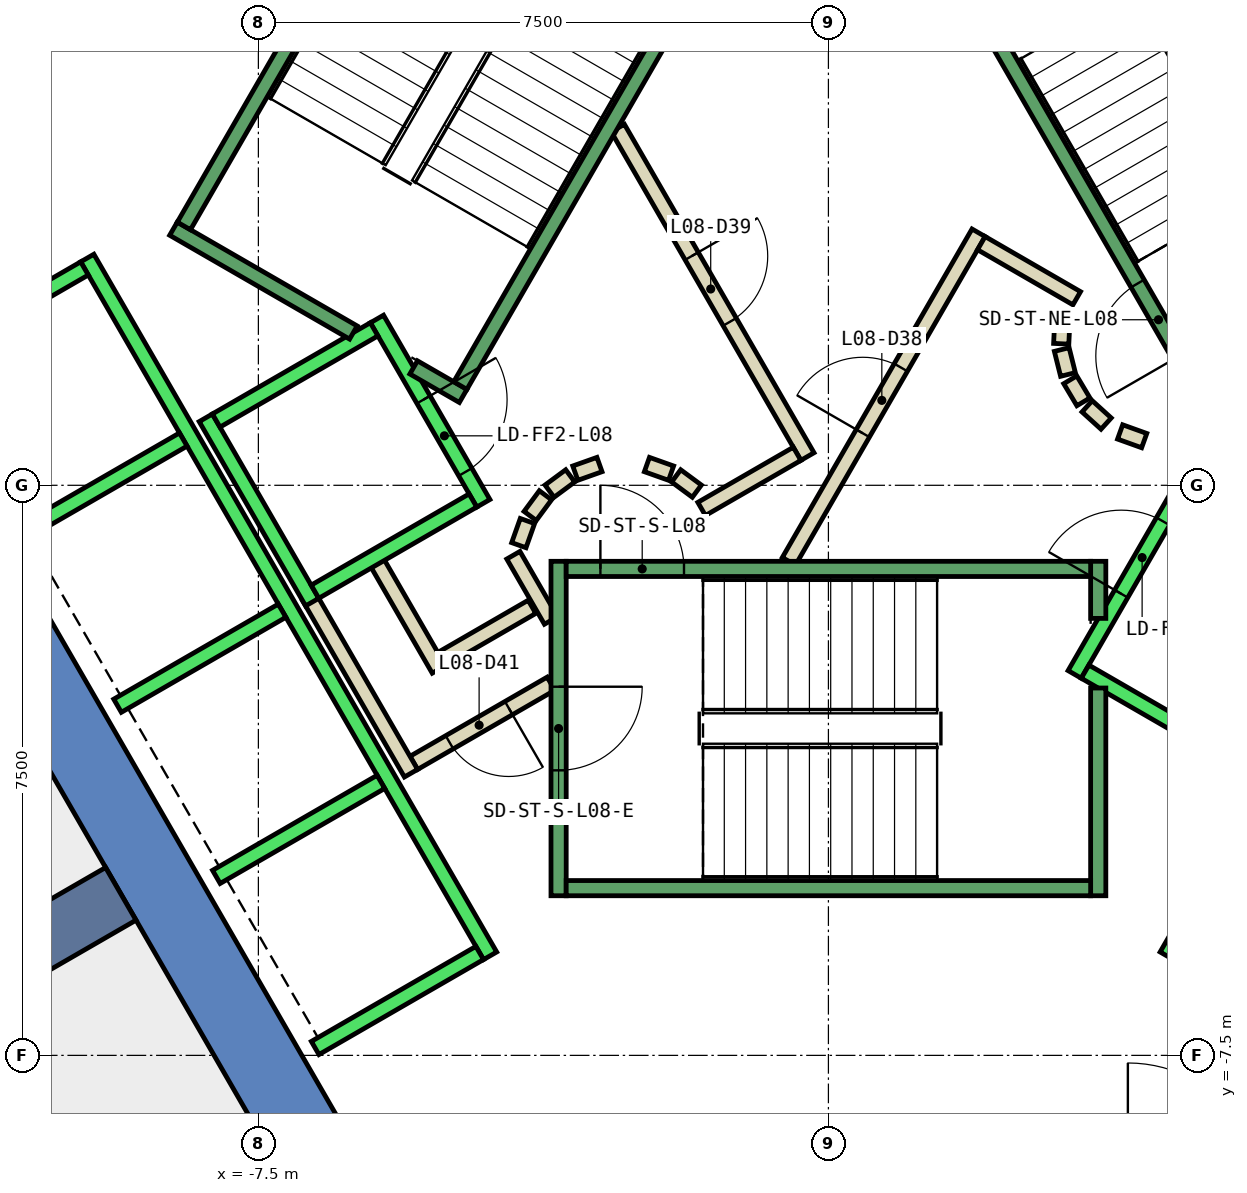
"""IFC4 building model, lengths in metres.
Left out: names, types, materials, properties, quantities, classifications, styles, units other than length and angle.
Written with IfcOpenShell. Run it as: python <this file> out.ifc"""

import sys

from ifc_helpers import new_model, si_unit, direction, frame, frame_2d, origin, place, context, subcontext, project, spatial, polyline, rectangle, outline, extrude, element, fill, save


model = new_model("IFC4")
c1 = context("Model", 3, precision=1e-05, world=origin(), true_north=direction((0.0, 1.0)))
c2 = subcontext(c1, "Body", "Model", "MODEL_VIEW")
j1 = project(units=[si_unit("LENGTHUNIT", "METRE"), si_unit("PLANEANGLEUNIT", "RADIAN")], contexts=[c1])
p1 = place(None, origin())
s1 = spatial("IfcSite", under=j1, at=p1, CompositionType="ELEMENT")
p2 = place(p1, origin())
s2 = spatial("IfcBuilding", under=s1, at=p2, CompositionType="ELEMENT")
p3 = place(p2, frame((0.0, 0.0, 43.4)))
s3 = spatial("IfcBuildingStorey", under=s2, at=p3, CompositionType="ELEMENT", Elevation=43.4)
p4 = place(p3, frame((0.0, 0.0, -0.4)))
e1 = element("IfcWall", 1, at=p4, inside=s3, PredefinedType="SHEAR", context=c2, shape_type="SweptSolid", body=[
    extrude(outline(polyline([(-12.267, 5.252), (-11.402, 4.752), (-6.351, 13.5), (-6.928, 14.5), (-12.267, 5.252)])), origin(), (0.0, 0.0, 1.0), 4.2),
])
p5 = place(p3, frame((0.0, 0.0, -0.4)))
e2 = element("IfcWall", 2, at=p5, inside=s3, PredefinedType="SHEAR", context=c2, shape_type="SweptSolid", body=[
    extrude(outline(polyline([(-13.856, 2.5), (-6.928, -9.5), (-6.351, -8.5), (-12.702, 2.5), (-13.856, 2.5)])), origin(), (0.0, 0.0, 1.0), 4.2),
])
p6 = place(p3, frame((-9.31, -5.375, -0.4), z_axis=(0.0, 0.0, 1.0), x_axis=(-0.866017533419, -0.500013631625, 0.0)))
e3 = element("IfcWall", 3, at=p6, inside=s3, PredefinedType="SHEAR", context=c2, shape_type="SweptSolid", body=[
    extrude(rectangle(XDim=9.0, YDim=0.8, at=frame_2d((4.5, 0.0))), origin(), (0.0, 0.0, 1.0), 4.2),
])
p7 = place(p3, frame((-3.9, -1.599, 0.0), z_axis=(0.0, 0.0, 1.0), x_axis=(-0.865969445389, -0.500096910261, 0.0)))
e4 = element("IfcWall", 4, at=p7, inside=s3, PredefinedType="PARTITIONING", context=c2, shape_type="SweptSolid", body=[
    extrude(rectangle(XDim=1.373, YDim=0.2, at=frame_2d((0.687, 0.0))), origin(), (0.0, 0.0, 1.0), 3.8),
])
p8 = place(p3, frame((-5.126, -2.422, 0.0), z_axis=(0.0, 0.0, 1.0), x_axis=(-0.500062241894, 0.865989465428, 0.0)))
e5 = element("IfcWall", 5, at=p8, inside=s3, PredefinedType="PARTITIONING", context=c2, shape_type="SweptSolid", body=[
    extrude(rectangle(XDim=1.7, YDim=0.2, at=frame_2d((0.85, 0.0))), origin(), (0.0, 0.0, 1.0), 3.8),
])
p9 = place(p3, frame((-3.65, -2.61, 0.0), z_axis=(0.0, 0.0, 1.0), x_axis=(-0.866072462134, -0.499918483688, 0.0)))
e6 = element("IfcWall", 6, at=p9, inside=s3, PredefinedType="PARTITIONING", context=c2, shape_type="SweptSolid", body=[
    extrude(rectangle(XDim=2.084, YDim=0.2, at=frame_2d((1.042, 0.0))), origin(), (0.0, 0.0, 1.0), 3.8),
])
p10 = place(p9, frame((0.642, 0.0, 0.0)))
e7 = element("IfcOpeningElement", 7, at=p10, cuts=e6, PredefinedType="OPENING", context=c2, shape_type="SweptSolid", body=[
    extrude(rectangle(XDim=0.9, YDim=2.1, at=frame_2d((0.45, 1.05))), frame((0.0, 0.11, 0.0), z_axis=(0.0, -1.0, 0.0), x_axis=(1.0, 0.0, 0.0)), (0.0, 0.0, 1.0), 0.22),
])
p11 = place(p3, frame((-5.492, -3.788, 0.0), z_axis=(0.0, 0.0, 1.0), x_axis=(-0.500008949224, 0.866020236886, 0.0)))
e8 = element("IfcWall", 8, at=p11, inside=s3, PredefinedType="PARTITIONING", context=c2, shape_type="SweptSolid", body=[
    extrude(rectangle(XDim=2.68, YDim=0.2, at=frame_2d((1.34, 0.0))), origin(), (0.0, 0.0, 1.0), 3.8),
])
p12 = place(p3, frame((-4.145, -0.92, 0.0), z_axis=(0.0, 0.0, 1.0), x_axis=(0.499743786207, -0.866173278362, 0.0)))
e9 = element("IfcWall", 9, at=p12, inside=s3, PredefinedType="PARTITIONING", context=c2, shape_type="SweptSolid", body=[
    extrude(rectangle(XDim=0.991, YDim=0.2, at=frame_2d((0.495, 0.0))), origin(), (0.0, 0.0, 1.0), 3.8),
])
p13 = place(p3, frame((-0.52, -1.0, 0.0), z_axis=(0.0, 0.0, 1.0), x_axis=(0.50011622646, 0.865958290007, 0.0)))
e10 = element("IfcWall", 10, at=p13, inside=s3, PredefinedType="PARTITIONING", context=c2, shape_type="SweptSolid", body=[
    extrude(rectangle(XDim=4.991, YDim=0.2, at=frame_2d((2.496, 0.0))), origin(), (0.0, 0.0, 1.0), 3.8),
])
p14 = place(p13, frame((1.945, 0.0, 0.0)))
e11 = element("IfcOpeningElement", 11, at=p14, cuts=e10, PredefinedType="OPENING", context=c2, shape_type="SweptSolid", body=[
    extrude(rectangle(XDim=1.0, YDim=2.1, at=frame_2d((0.5, 1.05))), frame((0.0, 0.11, 0.0), z_axis=(0.0, -1.0, 0.0), x_axis=(1.0, 0.0, 0.0)), (0.0, 0.0, 1.0), 0.22),
])
p15 = place(p3, frame((2.012, 3.186, 0.0), z_axis=(0.0, 0.0, 1.0), x_axis=(0.865891012941, -0.500232699559, 0.0)))
e12 = element("IfcWall", 12, at=p15, inside=s3, PredefinedType="PARTITIONING", context=c2, shape_type="SweptSolid", body=[
    extrude(rectangle(XDim=1.449, YDim=0.2, at=frame_2d((0.725, 0.0))), origin(), (0.0, 0.0, 1.0), 3.8),
])
p16 = place(p3, frame((3.079, 2.199, 0.0), z_axis=(0.0, 0.0, 1.0), x_axis=(-0.047771483479, -0.998858290933, 0.0)))
e13 = element("IfcWall", 13, at=p16, inside=s3, PredefinedType="PARTITIONING", context=c2, shape_type="SweptSolid", body=[
    extrude(rectangle(XDim=0.337, YDim=0.2, at=frame_2d((0.169, 0.0))), origin(), (0.0, 0.0, 1.0), 3.8),
])
p17 = place(p3, frame((3.07, 1.786, 0.0), z_axis=(0.0, 0.0, 1.0), x_axis=(0.242705583207, -0.970099994784, 0.0)))
e14 = element("IfcWall", 14, at=p17, inside=s3, PredefinedType="PARTITIONING", context=c2, shape_type="SweptSolid", body=[
    extrude(rectangle(XDim=0.338, YDim=0.2, at=frame_2d((0.169, 0.0))), origin(), (0.0, 0.0, 1.0), 3.8),
])
for number, where, z_axis, x_axis in (
    (15, (3.182, 1.388, 0.0), (0.0, 0.0, 1.0), (0.512, -0.859, 0.0)),
    (16, (3.404, 1.039, 0.0), (0.0, 0.0, 1.0), (0.74, -0.672, 0.0)),
):
    element("IfcWall", number, at=place(p3, frame(where, z_axis=z_axis, x_axis=x_axis)), inside=s3, PredefinedType="PARTITIONING", context=c2, shape_type="SweptSolid", body=[
        extrude(rectangle(XDim=0.338, YDim=0.2, at=frame_2d((0.169, 0.0))), origin(), (0.0, 0.0, 1.0), 3.8),
    ])
p18 = place(p3, frame((3.838, 0.702, 0.0), z_axis=(0.0, 0.0, 1.0), x_axis=(0.941035081519, -0.338308993895, 0.0)))
e17 = element("IfcWall", 17, at=p18, inside=s3, PredefinedType="PARTITIONING", context=c2, shape_type="SweptSolid", body=[
    extrude(rectangle(XDim=0.337, YDim=0.2, at=frame_2d((0.168, 0.0))), origin(), (0.0, 0.0, 1.0), 3.8),
])
p19 = place(p3, frame((-2.771, 4.7, 0.0), z_axis=(0.0, 0.0, 1.0), x_axis=(0.499969479948, -0.866043023828, 0.0)))
e18 = element("IfcWall", 18, at=p19, inside=s3, PredefinedType="PARTITIONING", context=c2, shape_type="SweptSolid", body=[
    extrude(rectangle(XDim=4.99, YDim=0.2, at=frame_2d((2.495, 0.0))), origin(), (0.0, 0.0, 1.0), 3.8),
])
p20 = place(p19, frame((1.945, 0.0, 0.0)))
e19 = element("IfcOpeningElement", 19, at=p20, cuts=e18, PredefinedType="OPENING", context=c2, shape_type="SweptSolid", body=[
    extrude(rectangle(XDim=1.0, YDim=2.1, at=frame_2d((0.5, 1.05))), frame((0.0, 0.11, 0.0), z_axis=(0.0, -1.0, 0.0), x_axis=(1.0, 0.0, 0.0)), (0.0, 0.0, 1.0), 0.22),
])
p21 = place(p3, frame((-0.412, 0.414, 0.0), z_axis=(0.0, 0.0, 1.0), x_axis=(-0.866017369001, -0.500013916395, 0.0)))
e20 = element("IfcWall", 20, at=p21, inside=s3, PredefinedType="PARTITIONING", context=c2, shape_type="SweptSolid", body=[
    extrude(rectangle(XDim=1.45, YDim=0.2, at=frame_2d((0.725, 0.0))), origin(), (0.0, 0.0, 1.0), 3.8),
])
p22 = place(p3, frame((-1.731, -0.077, 0.0), z_axis=(0.0, 0.0, 1.0), x_axis=(-0.804311165252, 0.594208338422, 0.0)))
e21 = element("IfcWall", 21, at=p22, inside=s3, PredefinedType="PARTITIONING", context=c2, shape_type="SweptSolid", body=[
    extrude(rectangle(XDim=0.338, YDim=0.2, at=frame_2d((0.169, 0.0))), origin(), (0.0, 0.0, 1.0), 3.8),
])
p23 = place(p3, frame((-2.07, 0.16, 0.0), z_axis=(0.0, 0.0, 1.0), x_axis=(-0.942199461132, 0.335052496547, 0.0)))
e22 = element("IfcWall", 22, at=p23, inside=s3, PredefinedType="PARTITIONING", context=c2, shape_type="SweptSolid", body=[
    extrude(rectangle(XDim=0.337, YDim=0.2, at=frame_2d((0.169, 0.0))), origin(), (0.0, 0.0, 1.0), 3.8),
])
p24 = place(p3, frame((-3.012, 0.273, 0.0), z_axis=(0.0, 0.0, 1.0), x_axis=(-0.942280615813, -0.334824194261, 0.0)))
e23 = element("IfcWall", 23, at=p24, inside=s3, PredefinedType="PARTITIONING", context=c2, shape_type="SweptSolid", body=[
    extrude(rectangle(XDim=0.338, YDim=0.2, at=frame_2d((0.169, 0.0))), origin(), (0.0, 0.0, 1.0), 3.8),
])
p25 = place(p3, frame((-3.397, 0.124, 0.0), z_axis=(0.0, 0.0, 1.0), x_axis=(-0.804311165252, -0.594208338422, 0.0)))
e24 = element("IfcWall", 24, at=p25, inside=s3, PredefinedType="PARTITIONING", context=c2, shape_type="SweptSolid", body=[
    extrude(rectangle(XDim=0.338, YDim=0.2, at=frame_2d((0.169, 0.0))), origin(), (0.0, 0.0, 1.0), 3.8),
])
p26 = place(p3, frame((-3.723, -0.131, 0.0), z_axis=(0.0, 0.0, 1.0), x_axis=(-0.594675113454, -0.803966112121, 0.0)))
e25 = element("IfcWall", 25, at=p26, inside=s3, PredefinedType="PARTITIONING", context=c2, shape_type="SweptSolid", body=[
    extrude(rectangle(XDim=0.338, YDim=0.2, at=frame_2d((0.169, 0.0))), origin(), (0.0, 0.0, 1.0), 3.8),
])
p27 = place(p3, frame((-3.96, -0.47, 0.0), z_axis=(0.0, 0.0, 1.0), x_axis=(-0.334824194261, -0.942280615813, 0.0)))
e26 = element("IfcWall", 26, at=p27, inside=s3, PredefinedType="PARTITIONING", context=c2, shape_type="SweptSolid", body=[
    extrude(rectangle(XDim=0.338, YDim=0.2, at=frame_2d((0.169, 0.0))), origin(), (0.0, 0.0, 1.0), 3.8),
])
p28 = place(p3, frame((-5.94, 2.188, 0.0), z_axis=(0.0, 0.0, 1.0), x_axis=(0.49994636267, -0.866056369097, 0.0)))
e27 = element("IfcWall", 27, at=p28, inside=s3, PredefinedType="STANDARD", context=c2, shape_type="SweptSolid", body=[
    extrude(rectangle(XDim=2.8, YDim=0.2, at=frame_2d((1.4, 0.0))), origin(), (0.0, 0.0, 1.0), 3.8),
])
p29 = place(p28, frame((1.225, 0.0, 0.0)))
e28 = element("IfcOpeningElement", 28, at=p29, cuts=e27, PredefinedType="OPENING", context=c2, shape_type="SweptSolid", body=[
    extrude(rectangle(XDim=1.1, YDim=2.1, at=frame_2d((0.55, 1.05))), frame((0.0, 0.11, 0.0), z_axis=(0.0, -1.0, 0.0), x_axis=(1.0, 0.0, 0.0)), (0.0, 0.0, 1.0), 0.22),
])
p30 = place(p3, frame((-8.192, 0.888, 0.0), z_axis=(0.0, 0.0, 1.0), x_axis=(0.49994636267, -0.866056369097, 0.0)))
e29 = element("IfcWall", 29, at=p30, inside=s3, PredefinedType="STANDARD", context=c2, shape_type="SweptSolid", body=[
    extrude(rectangle(XDim=2.8, YDim=0.2, at=frame_2d((1.4, 0.0))), origin(), (0.0, 0.0, 1.0), 3.8),
])
for number, where, z_axis, x_axis in (
    (30, (-5.977, 2.052, 0.0), (0.0, 0.0, 1.0), (-0.866, -0.5, 0.0)),
    (31, (-4.677, -0.2, 0.0), (0.0, 0.0, 1.0), (-0.866, -0.5, 0.0)),
):
    element("IfcWall", number, at=place(p3, frame(where, z_axis=z_axis, x_axis=x_axis)), inside=s3, PredefinedType="STANDARD", context=c2, shape_type="SweptSolid", body=[
        extrude(rectangle(XDim=2.399, YDim=0.2, at=frame_2d((1.2, 0.0))), origin(), (0.0, 0.0, 1.0), 3.8),
    ])
p31 = place(p3, frame((-9.751, 2.99, 0.0), z_axis=(0.0, 0.0, 1.0), x_axis=(0.50000090737, -0.866024879913, 0.0)))
e32 = element("IfcWall", 32, at=p31, inside=s3, PredefinedType="STANDARD", context=c2, shape_type="SweptSolid", body=[
    extrude(rectangle(XDim=10.6, YDim=0.2, at=frame_2d((5.3, 0.0))), origin(), (0.0, 0.0, 1.0), 3.8),
])
p32 = place(p3, frame((-9.788, 2.853, 0.0), z_axis=(0.0, 0.0, 1.0), x_axis=(-0.865998541277, -0.500046524342, 0.0)))
e33 = element("IfcWall", 33, at=p32, inside=s3, PredefinedType="STANDARD", context=c2, shape_type="SweptSolid", body=[
    extrude(rectangle(XDim=2.5, YDim=0.2, at=frame_2d((1.25, 0.0))), origin(), (0.0, 0.0, 1.0), 3.8),
])
for number, where, z_axis, x_axis in (
    (34, (-8.488, 0.602, 0.0), (0.0, 0.0, 1.0), (-0.866, -0.5, 0.0)),
    (35, (-7.188, -1.65, 0.0), (0.0, 0.0, 1.0), (-0.866, -0.5, 0.0)),
    (36, (-5.888, -3.902, 0.0), (0.0, 0.0, 1.0), (-0.866, -0.5, 0.0)),
    (37, (-4.588, -6.153, 0.0), (0.0, 0.0, 1.0), (-0.866, -0.5, 0.0)),
):
    element("IfcWall", number, at=place(p3, frame(where, z_axis=z_axis, x_axis=x_axis)), inside=s3, PredefinedType="STANDARD", context=c2, shape_type="SweptSolid", body=[
        extrude(rectangle(XDim=2.5, YDim=0.2, at=frame_2d((1.25, 0.0))), origin(), (0.0, 0.0, 1.0), 3.8),
    ])
p33 = place(p3, frame((3.24, -2.488, 0.0), z_axis=(0.0, 0.0, 1.0), x_axis=(0.49994636267, 0.866056369097, 0.0)))
e38 = element("IfcWall", 38, at=p33, inside=s3, PredefinedType="STANDARD", context=c2, shape_type="SweptSolid", body=[
    extrude(rectangle(XDim=2.8, YDim=0.2, at=frame_2d((1.4, 0.0))), origin(), (0.0, 0.0, 1.0), 3.8),
])
p34 = place(p33, frame((1.225, 0.0, 0.0)))
e39 = element("IfcOpeningElement", 39, at=p34, cuts=e38, PredefinedType="OPENING", context=c2, shape_type="SweptSolid", body=[
    extrude(rectangle(XDim=1.1, YDim=2.1, at=frame_2d((0.55, 1.05))), frame((0.0, 0.11, 0.0), z_axis=(0.0, -1.0, 0.0), x_axis=(1.0, 0.0, 0.0)), (0.0, 0.0, 1.0), 0.22),
])
p35 = place(p3, frame((3.377, -2.452, 0.0), z_axis=(0.0, 0.0, 1.0), x_axis=(0.865955154139, -0.50012165622, 0.0)))
e40 = element("IfcWall", 40, at=p35, inside=s3, PredefinedType="STANDARD", context=c2, shape_type="SweptSolid", body=[
    extrude(rectangle(XDim=2.4, YDim=0.2, at=frame_2d((1.2, 0.0))), origin(), (0.0, 0.0, 1.0), 3.8),
])
p36 = place(p3, frame((4.451, -6.19, 0.0), z_axis=(0.0, 0.0, 1.0), x_axis=(0.50000090737, 0.866024879913, 0.0)))
e41 = element("IfcWall", 41, at=p36, inside=s3, PredefinedType="STANDARD", context=c2, shape_type="SweptSolid", body=[
    extrude(rectangle(XDim=10.6, YDim=0.2, at=frame_2d((5.3, 0.0))), origin(), (0.0, 0.0, 1.0), 3.8),
])
p37 = place(p3, frame((-3.55, -1.0, 0.0), z_axis=(0.0, 0.0, 1.0), x_axis=(0.0, -1.0, 0.0)))
e42 = element("IfcWall", 42, at=p37, inside=s3, PredefinedType="STANDARD", context=c2, shape_type="SweptSolid", body=[
    extrude(rectangle(XDim=4.4, YDim=0.2, at=frame_2d((2.2, 0.0))), origin(), (0.0, 0.0, 1.0), 3.8),
])
p38 = place(p37, frame((1.65, 0.0, 0.0)))
e43 = element("IfcOpeningElement", 43, at=p38, cuts=e42, PredefinedType="OPENING", context=c2, shape_type="SweptSolid", body=[
    extrude(rectangle(XDim=1.1, YDim=2.2, at=frame_2d((0.55, 1.1))), frame((0.0, 0.11, 0.0), z_axis=(0.0, -1.0, 0.0), x_axis=(1.0, 0.0, 0.0)), (0.0, 0.0, 1.0), 0.22),
])
p39 = place(p3, frame((3.55, -2.667, 0.0), z_axis=(0.0, 0.0, 1.0), x_axis=(0.0, -1.0, 0.0)))
e44 = element("IfcWall", 44, at=p39, inside=s3, PredefinedType="STANDARD", context=c2, shape_type="SweptSolid", body=[
    extrude(rectangle(XDim=2.733, YDim=0.2, at=frame_2d((1.366, 0.0))), origin(), (0.0, 0.0, 1.0), 3.8),
])
p40 = place(p3, frame((3.55, -1.0, 0.0), z_axis=(0.0, 0.0, 1.0), x_axis=(0.0, -1.0, 0.0)))
e45 = element("IfcWall", 45, at=p40, inside=s3, PredefinedType="STANDARD", context=c2, shape_type="SweptSolid", body=[
    extrude(rectangle(XDim=0.751, YDim=0.2, at=frame_2d((0.375, 0.0))), origin(), (0.0, 0.0, 1.0), 3.8),
])
p41 = place(p3, frame((-3.45, -1.1, 0.0), z_axis=(0.0, 0.0, 1.0), x_axis=(1.0, 0.0, 0.0)))
e46 = element("IfcWall", 46, at=p41, inside=s3, PredefinedType="STANDARD", context=c2, shape_type="SweptSolid", body=[
    extrude(rectangle(XDim=6.9, YDim=0.2, at=frame_2d((3.45, 0.0))), origin(), (0.0, 0.0, 1.0), 3.8),
])
p42 = place(p41, frame((0.45, 0.0, 0.0)))
e47 = element("IfcOpeningElement", 47, at=p42, cuts=e46, PredefinedType="OPENING", context=c2, shape_type="SweptSolid", body=[
    extrude(rectangle(XDim=1.1, YDim=2.2, at=frame_2d((0.55, 1.1))), frame((0.0, 0.11, 0.0), z_axis=(0.0, -1.0, 0.0), x_axis=(1.0, 0.0, 0.0)), (0.0, 0.0, 1.0), 0.22),
])
p43 = place(p3, frame((-3.45, -5.3, 0.0), z_axis=(0.0, 0.0, 1.0), x_axis=(1.0, 0.0, 0.0)))
e48 = element("IfcWall", 48, at=p43, inside=s3, PredefinedType="STANDARD", context=c2, shape_type="SweptSolid", body=[
    extrude(rectangle(XDim=6.9, YDim=0.2, at=frame_2d((3.45, 0.0))), origin(), (0.0, 0.0, 1.0), 3.8),
])
p44 = place(p3, frame((4.843, 1.312, 0.0), z_axis=(0.0, 0.0, 1.0), x_axis=(-0.499963383562, 0.866046543262, 0.0)))
e49 = element("IfcWall", 49, at=p44, inside=s3, PredefinedType="STANDARD", context=c2, shape_type="SweptSolid", body=[
    extrude(rectangle(XDim=6.9, YDim=0.2, at=frame_2d((3.45, 0.0))), origin(), (0.0, 0.0, 1.0), 3.8),
])
p45 = place(p44, frame((0.45, 0.0, 0.0)))
e50 = element("IfcOpeningElement", 50, at=p45, cuts=e49, PredefinedType="OPENING", context=c2, shape_type="SweptSolid", body=[
    extrude(rectangle(XDim=1.1, YDim=2.2, at=frame_2d((0.55, 1.1))), frame((0.0, 0.11, 0.0), z_axis=(0.0, -1.0, 0.0), x_axis=(1.0, 0.0, 0.0)), (0.0, 0.0, 1.0), 0.22),
])
p46 = place(p3, frame((-6.25, 2.01, 0.0), z_axis=(0.0, 0.0, 1.0), x_axis=(-0.86611865017, 0.499838457731, 0.0)))
e51 = element("IfcWall", 51, at=p46, inside=s3, PredefinedType="STANDARD", context=c2, shape_type="SweptSolid", body=[
    extrude(rectangle(XDim=2.733, YDim=0.2, at=frame_2d((1.366, 0.0))), origin(), (0.0, 0.0, 1.0), 3.8),
])
p47 = place(p3, frame((-4.806, 1.176, 0.0), z_axis=(0.0, 0.0, 1.0), x_axis=(-0.866558586415, 0.499075361355, 0.0)))
e52 = element("IfcWall", 52, at=p47, inside=s3, PredefinedType="STANDARD", context=c2, shape_type="SweptSolid", body=[
    extrude(rectangle(XDim=0.751, YDim=0.2, at=frame_2d((0.376, 0.0))), origin(), (0.0, 0.0, 1.0), 3.8),
])
p48 = place(p3, frame((-1.393, 7.288, 0.0), z_axis=(0.0, 0.0, 1.0), x_axis=(-0.499963383562, -0.866046543262, 0.0)))
e53 = element("IfcWall", 53, at=p48, inside=s3, PredefinedType="STANDARD", context=c2, shape_type="SweptSolid", body=[
    extrude(rectangle(XDim=6.9, YDim=0.2, at=frame_2d((3.45, 0.0))), origin(), (0.0, 0.0, 1.0), 3.8),
])
p49 = place(p48, frame((0.45, 0.0, 0.0)))
e54 = element("IfcOpeningElement", 54, at=p49, cuts=e53, PredefinedType="OPENING", context=c2, shape_type="SweptSolid", body=[
    extrude(rectangle(XDim=1.1, YDim=2.2, at=frame_2d((0.55, 1.1))), frame((0.0, 0.11, 0.0), z_axis=(0.0, -1.0, 0.0), x_axis=(1.0, 0.0, 0.0)), (0.0, 0.0, 1.0), 0.22),
])
p50 = place(p3, frame((-5.03, 9.388, 0.0), z_axis=(0.0, 0.0, 1.0), x_axis=(-0.499978703459, -0.866037698999, 0.0)))
e55 = element("IfcWall", 55, at=p50, inside=s3, PredefinedType="STANDARD", context=c2, shape_type="SweptSolid", body=[
    extrude(rectangle(XDim=6.9, YDim=0.2, at=frame_2d((3.45, 0.0))), origin(), (0.0, 0.0, 1.0), 3.8),
])
p51 = place(p14, origin())
e56 = element("IfcDoor", 56, at=p51, inside=s3, OperationType="SINGLE_SWING_LEFT", PredefinedType="DOOR", context=c2, shape_type="SweptSolid", body=[
    extrude(rectangle(XDim=1.0, YDim=2.1, at=frame_2d((0.5, 1.05))), frame((0.0, 0.025, 0.0), z_axis=(0.0, -1.0, 0.0), x_axis=(1.0, 0.0, 0.0)), (0.0, 0.0, 1.0), 0.05),
])
fill(e11, e56)
p52 = place(p20, origin())
e57 = element("IfcDoor", 57, at=p52, inside=s3, OperationType="SINGLE_SWING_RIGHT", PredefinedType="DOOR", context=c2, shape_type="SweptSolid", body=[
    extrude(rectangle(XDim=1.0, YDim=2.1, at=frame_2d((0.5, 1.05))), frame((0.0, 0.025, 0.0), z_axis=(0.0, -1.0, 0.0), x_axis=(1.0, 0.0, 0.0)), (0.0, 0.0, 1.0), 0.05),
])
fill(e19, e57)
p53 = place(p10, origin())
e58 = element("IfcDoor", 58, at=p53, inside=s3, OperationType="SINGLE_SWING_LEFT", PredefinedType="DOOR", context=c2, shape_type="SweptSolid", body=[
    extrude(rectangle(XDim=0.9, YDim=2.1, at=frame_2d((0.45, 1.05))), frame((0.0, 0.025, 0.0), z_axis=(0.0, -1.0, 0.0), x_axis=(1.0, 0.0, 0.0)), (0.0, 0.0, 1.0), 0.05),
])
fill(e7, e58)
p54 = place(p34, origin())
e59 = element("IfcDoor", 59, at=p54, inside=s3, OperationType="SLIDING_TO_LEFT", PredefinedType="DOOR", context=c2, shape_type="SweptSolid", body=[
    extrude(rectangle(XDim=1.1, YDim=2.1, at=frame_2d((0.55, 1.05))), frame((0.0, 0.025, 0.0), z_axis=(0.0, -1.0, 0.0), x_axis=(1.0, 0.0, 0.0)), (0.0, 0.0, 1.0), 0.05),
])
fill(e39, e59)
p55 = place(p29, origin())
e60 = element("IfcDoor", 60, at=p55, inside=s3, OperationType="SLIDING_TO_LEFT", PredefinedType="DOOR", context=c2, shape_type="SweptSolid", body=[
    extrude(rectangle(XDim=1.1, YDim=2.1, at=frame_2d((0.55, 1.05))), frame((0.0, 0.025, 0.0), z_axis=(0.0, -1.0, 0.0), x_axis=(1.0, 0.0, 0.0)), (0.0, 0.0, 1.0), 0.05),
])
fill(e28, e60)
p56 = place(p42, origin())
e61 = element("IfcDoor", 61, at=p56, inside=s3, OperationType="SINGLE_SWING_LEFT", PredefinedType="DOOR", context=c2, shape_type="SweptSolid", body=[
    extrude(rectangle(XDim=1.1, YDim=2.2, at=frame_2d((0.55, 1.1))), frame((0.0, 0.025, 0.0), z_axis=(0.0, -1.0, 0.0), x_axis=(1.0, 0.0, 0.0)), (0.0, 0.0, 1.0), 0.05),
])
fill(e47, e61)
p57 = place(p38, origin())
e62 = element("IfcDoor", 62, at=p57, inside=s3, OperationType="SINGLE_SWING_LEFT", PredefinedType="DOOR", context=c2, shape_type="SweptSolid", body=[
    extrude(rectangle(XDim=1.1, YDim=2.2, at=frame_2d((0.55, 1.1))), frame((0.0, 0.025, 0.0), z_axis=(0.0, -1.0, 0.0), x_axis=(1.0, 0.0, 0.0)), (0.0, 0.0, 1.0), 0.05),
])
fill(e43, e62)
p58 = place(p45, origin())
e63 = element("IfcDoor", 63, at=p58, inside=s3, OperationType="SINGLE_SWING_LEFT", PredefinedType="DOOR", context=c2, shape_type="SweptSolid", body=[
    extrude(rectangle(XDim=1.1, YDim=2.2, at=frame_2d((0.55, 1.1))), frame((0.0, 0.025, 0.0), z_axis=(0.0, -1.0, 0.0), x_axis=(1.0, 0.0, 0.0)), (0.0, 0.0, 1.0), 0.05),
])
fill(e50, e63)
save(model, sys.argv[1])
